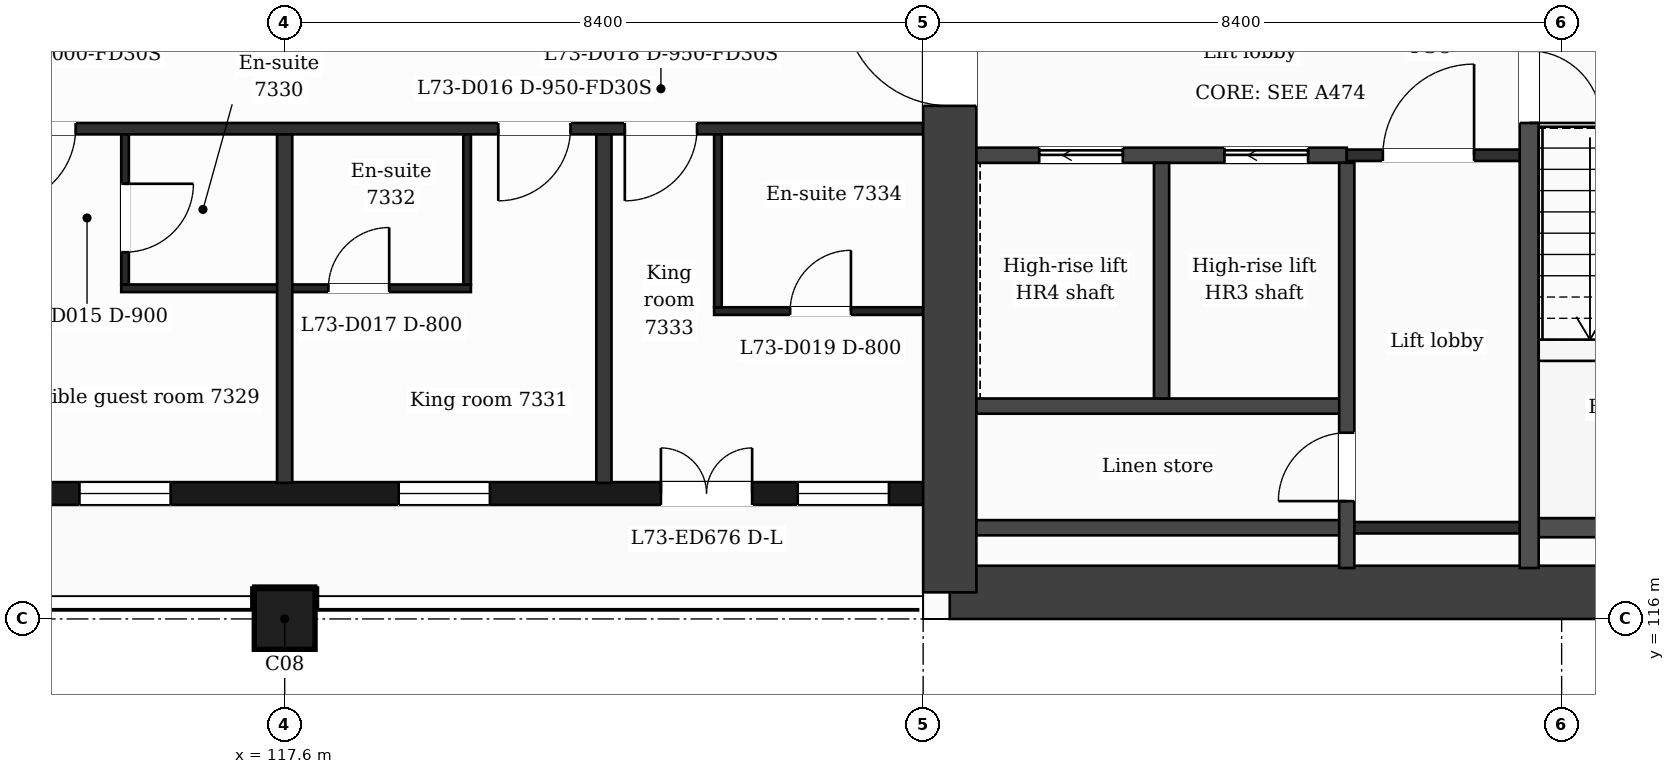
"""IFC4 building model, lengths in metres.
Left out: names, types, materials, properties, quantities, classifications, styles, units other than length and angle.
Written with IfcOpenShell. Run it as: python <this file> out.ifc"""

import sys

from ifc_helpers import new_model, si_unit, direction, frame, frame_2d, origin, origin_2d, place, context, subcontext, project, spatial, rectangle, extrude, element, fill, save


model = new_model("IFC4")
c1 = context("Model", 3, precision=1e-05, world=origin(), true_north=direction((0.0, 1.0)))
c2 = subcontext(c1, "Body", "Model", "MODEL_VIEW")
j1 = project(units=[si_unit("LENGTHUNIT", "METRE"), si_unit("PLANEANGLEUNIT", "RADIAN")], contexts=[c1])
p1 = place(None, origin())
s1 = spatial("IfcSite", under=j1, at=p1, CompositionType="ELEMENT")
p2 = place(p1, origin())
s2 = spatial("IfcBuilding", under=s1, at=p2, CompositionType="ELEMENT")
p3 = place(p2, frame((0.0, 0.0, 299.7)))
s3 = spatial("IfcBuildingStorey", under=s2, at=p3, CompositionType="ELEMENT", Elevation=299.7)
p4 = place(p3, frame((139.977, 116.35, 0.0), z_axis=(0.0, 0.0, 1.0), x_axis=(-1.0, 0.0, 0.0)))
e1 = element("IfcWall", 1, at=p4, inside=s3, PredefinedType="SHEAR", context=c2, shape_type="SweptSolid", body=[
    extrude(rectangle(XDim=13.626, YDim=0.7, at=frame_2d((6.813, 0.0))), origin(), (0.0, 0.0, 1.0), 3.7),
])
p5 = place(p3, frame((126.35, 116.35, 0.0), z_axis=(0.0, 0.0, 1.0), x_axis=(0.0, 1.0, 0.0)))
e2 = element("IfcWall", 2, at=p5, inside=s3, PredefinedType="SHEAR", context=c2, shape_type="SweptSolid", body=[
    extrude(rectangle(XDim=15.7, YDim=0.7, at=frame_2d((7.85, 0.0))), origin(), (0.0, 0.0, 1.0), 3.7),
])
p6 = place(p5, frame((6.4, 0.0, 0.0)))
e3 = element("IfcOpeningElement", 3, at=p6, cuts=e2, PredefinedType="OPENING", context=c2, shape_type="SweptSolid", body=[
    extrude(rectangle(XDim=1.4, YDim=2.1, at=frame_2d((0.7, 1.05))), frame((0.0, 0.36, 0.0), z_axis=(0.0, -1.0, 0.0), x_axis=(1.0, 0.0, 0.0)), (0.0, 0.0, 1.0), 0.72),
])
p7 = place(p3, frame((117.6, 116.0, 0.0), z_axis=(0.0, 0.0, 1.0), x_axis=(1.0, 0.0, 0.0)))
e4 = element("IfcColumn", 4, at=p7, inside=s3, PredefinedType="COLUMN", context=c2, shape_type="SweptSolid", body=[
    extrude(rectangle(XDim=0.8, YDim=0.8, at=origin_2d()), origin(), (0.0, 0.0, 1.0), 3.7),
])
p8 = place(p3, frame((100.8, 117.65, 0.0), z_axis=(0.0, 0.0, 1.0), x_axis=(1.0, 0.0, 0.0)))
e5 = element("IfcWall", 5, at=p8, inside=s3, PredefinedType="SOLIDWALL", context=c2, shape_type="SweptSolid", body=[
    extrude(rectangle(XDim=25.2, YDim=0.3, at=frame_2d((12.6, 0.0))), origin(), (0.0, 0.0, 1.0), 3.25),
])
p9 = place(p8, frame((0.95, 0.0, 0.9)))
e6 = element("IfcOpeningElement", 6, at=p9, cuts=e5, PredefinedType="OPENING", context=c2, shape_type="SweptSolid", body=[
    extrude(rectangle(XDim=2.4, YDim=2.1, at=frame_2d((1.2, 1.05))), frame((0.0, 0.16, 0.0), z_axis=(0.0, -1.0, 0.0), x_axis=(1.0, 0.0, 0.0)), (0.0, 0.0, 1.0), 0.32),
])
p10 = place(p8, frame((5.1, 0.0, 0.9)))
e7 = element("IfcOpeningElement", 7, at=p10, cuts=e5, PredefinedType="OPENING", context=c2, shape_type="SweptSolid", body=[
    extrude(rectangle(XDim=2.4, YDim=2.1, at=frame_2d((1.2, 1.05))), frame((0.0, 0.16, 0.0), z_axis=(0.0, -1.0, 0.0), x_axis=(1.0, 0.0, 0.0)), (0.0, 0.0, 1.0), 0.32),
])
p11 = place(p8, frame((9.3, 0.0, 0.9)))
e8 = element("IfcOpeningElement", 8, at=p11, cuts=e5, PredefinedType="OPENING", context=c2, shape_type="SweptSolid", body=[
    extrude(rectangle(XDim=2.4, YDim=2.1, at=frame_2d((1.2, 1.05))), frame((0.0, 0.16, 0.0), z_axis=(0.0, -1.0, 0.0), x_axis=(1.0, 0.0, 0.0)), (0.0, 0.0, 1.0), 0.32),
])
p12 = place(p8, frame((14.1, 0.0, 0.9)))
e9 = element("IfcOpeningElement", 9, at=p12, cuts=e5, PredefinedType="OPENING", context=c2, shape_type="SweptSolid", body=[
    extrude(rectangle(XDim=1.2, YDim=2.1, at=frame_2d((0.6, 1.05))), frame((0.0, 0.16, 0.0), z_axis=(0.0, -1.0, 0.0), x_axis=(1.0, 0.0, 0.0)), (0.0, 0.0, 1.0), 0.32),
])
p13 = place(p8, frame((18.3, 0.0, 0.9)))
e10 = element("IfcOpeningElement", 10, at=p13, cuts=e5, PredefinedType="OPENING", context=c2, shape_type="SweptSolid", body=[
    extrude(rectangle(XDim=1.2, YDim=2.1, at=frame_2d((0.6, 1.05))), frame((0.0, 0.16, 0.0), z_axis=(0.0, -1.0, 0.0), x_axis=(1.0, 0.0, 0.0)), (0.0, 0.0, 1.0), 0.32),
])
p14 = place(p8, frame((21.75, 0.0, 0.0)))
e11 = element("IfcOpeningElement", 11, at=p14, cuts=e5, PredefinedType="OPENING", context=c2, shape_type="SweptSolid", body=[
    extrude(rectangle(XDim=1.2, YDim=2.4, at=frame_2d((0.6, 1.2))), frame((0.0, 0.16, 0.0), z_axis=(0.0, -1.0, 0.0), x_axis=(1.0, 0.0, 0.0)), (0.0, 0.0, 1.0), 0.32),
])
p15 = place(p8, frame((23.55, 0.0, 0.9)))
e12 = element("IfcOpeningElement", 12, at=p15, cuts=e5, PredefinedType="OPENING", context=c2, shape_type="SweptSolid", body=[
    extrude(rectangle(XDim=1.2, YDim=2.1, at=frame_2d((0.6, 1.05))), frame((0.0, 0.16, 0.0), z_axis=(0.0, -1.0, 0.0), x_axis=(1.0, 0.0, 0.0)), (0.0, 0.0, 1.0), 0.32),
])
p16 = place(p3, frame((126.7, 117.2, 0.0), z_axis=(0.0, 0.0, 1.0), x_axis=(1.0, 0.0, 0.0)))
e13 = element("IfcWall", 13, at=p16, inside=s3, PredefinedType="PARTITIONING", context=c2, shape_type="SweptSolid", body=[
    extrude(rectangle(XDim=4.873, YDim=0.2, at=frame_2d((2.437, 0.0))), origin(), (0.0, 0.0, 1.0), 3.25),
])
p17 = place(p3, frame((131.573, 117.2, 0.0), z_axis=(0.0, 0.0, 1.0), x_axis=(1.0, 0.0, 0.0)))
e14 = element("IfcWall", 14, at=p17, inside=s3, PredefinedType="PARTITIONING", context=c2, shape_type="SweptSolid", body=[
    extrude(rectangle(XDim=2.4, YDim=0.15, at=frame_2d((1.2, 0.0))), origin(), (0.0, 0.0, 1.0), 3.25),
])
p18 = place(p3, frame((133.973, 117.2, 0.0), z_axis=(0.0, 0.0, 1.0), x_axis=(1.0, 0.0, 0.0)))
e15 = element("IfcWall", 15, at=p18, inside=s3, PredefinedType="PARTITIONING", context=c2, shape_type="SweptSolid", body=[
    extrude(rectangle(XDim=3.275, YDim=0.25, at=frame_2d((1.638, 0.0))), origin(), (0.0, 0.0, 1.0), 3.25),
])
p19 = place(p3, frame((126.7, 118.8, 0.0), z_axis=(0.0, 0.0, 1.0), x_axis=(1.0, 0.0, 0.0)))
e16 = element("IfcWall", 16, at=p19, inside=s3, PredefinedType="PARTITIONING", context=c2, shape_type="SweptSolid", body=[
    extrude(rectangle(XDim=4.873, YDim=0.2, at=frame_2d((2.437, 0.0))), origin(), (0.0, 0.0, 1.0), 3.25),
])
p20 = place(p3, frame((123.25, 120.05, 0.0), z_axis=(0.0, 0.0, 1.0), x_axis=(1.0, 0.0, 0.0)))
e17 = element("IfcWall", 17, at=p20, inside=s3, PredefinedType="PARTITIONING", context=c2, shape_type="SweptSolid", body=[
    extrude(rectangle(XDim=2.75, YDim=0.1, at=frame_2d((1.375, 0.0))), origin(), (0.0, 0.0, 1.0), 3.25),
])
p21 = place(p20, frame((1.0, 0.0, 0.0)))
e18 = element("IfcOpeningElement", 18, at=p21, cuts=e17, PredefinedType="OPENING", context=c2, shape_type="SweptSolid", body=[
    extrude(rectangle(XDim=0.8, YDim=2.1, at=frame_2d((0.4, 1.05))), frame((0.0, 0.06, 0.0), z_axis=(0.0, -1.0, 0.0), x_axis=(1.0, 0.0, 0.0)), (0.0, 0.0, 1.0), 0.12),
])
p22 = place(p3, frame((115.45, 120.35, 0.0), z_axis=(0.0, 0.0, 1.0), x_axis=(1.0, 0.0, 0.0)))
e19 = element("IfcWall", 19, at=p22, inside=s3, PredefinedType="PARTITIONING", context=c2, shape_type="SweptSolid", body=[
    extrude(rectangle(XDim=4.6, YDim=0.1, at=frame_2d((2.3, 0.0))), origin(), (0.0, 0.0, 1.0), 3.25),
])
p23 = place(p22, frame((2.725, 0.0, 0.0)))
e20 = element("IfcOpeningElement", 20, at=p23, cuts=e19, PredefinedType="OPENING", context=c2, shape_type="SweptSolid", body=[
    extrude(rectangle(XDim=0.8, YDim=2.1, at=frame_2d((0.4, 1.05))), frame((0.0, 0.06, 0.0), z_axis=(0.0, -1.0, 0.0), x_axis=(1.0, 0.0, 0.0)), (0.0, 0.0, 1.0), 0.12),
])
p24 = place(p3, frame((126.7, 122.1, 0.0), z_axis=(0.0, 0.0, 1.0), x_axis=(1.0, 0.0, 0.0)))
e21 = element("IfcWall", 21, at=p24, inside=s3, PredefinedType="PARTITIONING", context=c2, shape_type="SweptSolid", body=[
    extrude(rectangle(XDim=4.873, YDim=0.2, at=frame_2d((2.437, 0.0))), origin(), (0.0, 0.0, 1.0), 3.25),
])
p25 = place(p24, frame((3.264, 0.0, 0.0)))
e22 = element("IfcOpeningElement", 22, at=p25, cuts=e21, PredefinedType="OPENING", context=c2, shape_type="SweptSolid", body=[
    extrude(rectangle(XDim=1.1, YDim=2.1, at=frame_2d((0.55, 1.05))), frame((0.0, 0.11, 0.0), z_axis=(0.0, -1.0, 0.0), x_axis=(1.0, 0.0, 0.0)), (0.0, 0.0, 1.0), 0.22),
])
p26 = place(p24, frame((0.827, 0.0, 0.0)))
e23 = element("IfcOpeningElement", 23, at=p26, cuts=e21, PredefinedType="OPENING", context=c2, shape_type="SweptSolid", body=[
    extrude(rectangle(XDim=1.1, YDim=2.1, at=frame_2d((0.55, 1.05))), frame((0.0, 0.11, 0.0), z_axis=(0.0, -1.0, 0.0), x_axis=(1.0, 0.0, 0.0)), (0.0, 0.0, 1.0), 0.22),
])
p27 = place(p3, frame((131.573, 122.1, 0.0), z_axis=(0.0, 0.0, 1.0), x_axis=(1.0, 0.0, 0.0)))
e24 = element("IfcWall", 24, at=p27, inside=s3, PredefinedType="PARTITIONING", context=c2, shape_type="SweptSolid", body=[
    extrude(rectangle(XDim=2.4, YDim=0.15, at=frame_2d((1.2, 0.0))), origin(), (0.0, 0.0, 1.0), 3.25),
])
p28 = place(p27, frame((0.475, 0.0, 0.0)))
e25 = element("IfcOpeningElement", 25, at=p28, cuts=e24, PredefinedType="OPENING", context=c2, shape_type="SweptSolid", body=[
    extrude(rectangle(XDim=1.2, YDim=2.1, at=frame_2d((0.6, 1.05))), frame((0.0, 0.085, 0.0), z_axis=(0.0, -1.0, 0.0), x_axis=(1.0, 0.0, 0.0)), (0.0, 0.0, 1.0), 0.17),
])
p29 = place(p3, frame((100.8, 122.45, 0.0), z_axis=(0.0, 0.0, 1.0), x_axis=(1.0, 0.0, 0.0)))
e26 = element("IfcWall", 26, at=p29, inside=s3, PredefinedType="PARTITIONING", context=c2, shape_type="SweptSolid", body=[
    extrude(rectangle(XDim=25.2, YDim=0.15, at=frame_2d((12.6, 0.0))), origin(), (0.0, 0.0, 1.0), 3.25),
])
p30 = place(p29, frame((1.6, 0.0, 0.0)))
e27 = element("IfcOpeningElement", 27, at=p30, cuts=e26, PredefinedType="OPENING", context=c2, shape_type="SweptSolid", body=[
    extrude(rectangle(XDim=1.0, YDim=2.1, at=frame_2d((0.5, 1.05))), frame((0.0, 0.085, 0.0), z_axis=(0.0, -1.0, 0.0), x_axis=(1.0, 0.0, 0.0)), (0.0, 0.0, 1.0), 0.17),
])
p31 = place(p29, frame((11.12, 0.0, 0.0)))
e28 = element("IfcOpeningElement", 28, at=p31, cuts=e26, PredefinedType="OPENING", context=c2, shape_type="SweptSolid", body=[
    extrude(rectangle(XDim=0.95, YDim=2.1, at=frame_2d((0.475, 1.05))), frame((0.0, 0.085, 0.0), z_axis=(0.0, -1.0, 0.0), x_axis=(1.0, 0.0, 0.0)), (0.0, 0.0, 1.0), 0.17),
])
p32 = place(p29, frame((13.05, 0.0, 0.0)))
e29 = element("IfcOpeningElement", 29, at=p32, cuts=e26, PredefinedType="OPENING", context=c2, shape_type="SweptSolid", body=[
    extrude(rectangle(XDim=1.0, YDim=2.1, at=frame_2d((0.5, 1.05))), frame((0.0, 0.085, 0.0), z_axis=(0.0, -1.0, 0.0), x_axis=(1.0, 0.0, 0.0)), (0.0, 0.0, 1.0), 0.17),
])
p33 = place(p29, frame((19.61, 0.0, 0.0)))
e30 = element("IfcOpeningElement", 30, at=p33, cuts=e26, PredefinedType="OPENING", context=c2, shape_type="SweptSolid", body=[
    extrude(rectangle(XDim=0.95, YDim=2.1, at=frame_2d((0.475, 1.05))), frame((0.0, 0.085, 0.0), z_axis=(0.0, -1.0, 0.0), x_axis=(1.0, 0.0, 0.0)), (0.0, 0.0, 1.0), 0.17),
])
p34 = place(p29, frame((21.275, 0.0, 0.0)))
e31 = element("IfcOpeningElement", 31, at=p34, cuts=e26, PredefinedType="OPENING", context=c2, shape_type="SweptSolid", body=[
    extrude(rectangle(XDim=0.95, YDim=2.1, at=frame_2d((0.475, 1.05))), frame((0.0, 0.085, 0.0), z_axis=(0.0, -1.0, 0.0), x_axis=(1.0, 0.0, 0.0)), (0.0, 0.0, 1.0), 0.17),
])
p35 = place(p3, frame((115.5, 120.4, 0.0), z_axis=(0.0, 0.0, 1.0), x_axis=(0.0, 1.0, 0.0)))
e32 = element("IfcWall", 32, at=p35, inside=s3, PredefinedType="PARTITIONING", context=c2, shape_type="SweptSolid", body=[
    extrude(rectangle(XDim=1.975, YDim=0.1, at=frame_2d((0.988, 0.0))), origin(), (0.0, 0.0, 1.0), 3.25),
])
p36 = place(p35, frame((0.425, 0.0, 0.0)))
e33 = element("IfcOpeningElement", 33, at=p36, cuts=e32, PredefinedType="OPENING", context=c2, shape_type="SweptSolid", body=[
    extrude(rectangle(XDim=0.9, YDim=2.1, at=frame_2d((0.45, 1.05))), frame((0.0, 0.06, 0.0), z_axis=(0.0, -1.0, 0.0), x_axis=(1.0, 0.0, 0.0)), (0.0, 0.0, 1.0), 0.12),
])
p37 = place(p3, frame((117.6, 117.79, 0.0), z_axis=(0.0, 0.0, 1.0), x_axis=(0.0, 1.0, 0.0)))
e34 = element("IfcWall", 34, at=p37, inside=s3, PredefinedType="PARTITIONING", context=c2, shape_type="SweptSolid", body=[
    extrude(rectangle(XDim=4.585, YDim=0.2, at=frame_2d((2.292, 0.0))), origin(), (0.0, 0.0, 1.0), 3.25),
])
p38 = place(p3, frame((120.0, 120.4, 0.0), z_axis=(0.0, 0.0, 1.0), x_axis=(0.0, 1.0, 0.0)))
e35 = element("IfcWall", 35, at=p38, inside=s3, PredefinedType="PARTITIONING", context=c2, shape_type="SweptSolid", body=[
    extrude(rectangle(XDim=1.975, YDim=0.1, at=frame_2d((0.988, 0.0))), origin(), (0.0, 0.0, 1.0), 3.25),
])
p39 = place(p3, frame((121.8, 117.79, 0.0), z_axis=(0.0, 0.0, 1.0), x_axis=(0.0, 1.0, 0.0)))
e36 = element("IfcWall", 36, at=p39, inside=s3, PredefinedType="PARTITIONING", context=c2, shape_type="SweptSolid", body=[
    extrude(rectangle(XDim=4.585, YDim=0.2, at=frame_2d((2.292, 0.0))), origin(), (0.0, 0.0, 1.0), 3.25),
])
p40 = place(p3, frame((123.3, 120.1, 0.0), z_axis=(0.0, 0.0, 1.0), x_axis=(0.0, 1.0, 0.0)))
e37 = element("IfcWall", 37, at=p40, inside=s3, PredefinedType="PARTITIONING", context=c2, shape_type="SweptSolid", body=[
    extrude(rectangle(XDim=2.275, YDim=0.1, at=frame_2d((1.137, 0.0))), origin(), (0.0, 0.0, 1.0), 3.25),
])
p41 = place(p3, frame((129.136, 118.9, 0.0), z_axis=(0.0, 0.0, 1.0), x_axis=(0.0, 1.0, 0.0)))
e38 = element("IfcWall", 38, at=p41, inside=s3, PredefinedType="PARTITIONING", context=c2, shape_type="SweptSolid", body=[
    extrude(rectangle(XDim=3.1, YDim=0.2, at=frame_2d((1.55, 0.0))), origin(), (0.0, 0.0, 1.0), 3.25),
])
p42 = place(p3, frame((131.573, 116.67, 0.0), z_axis=(0.0, 0.0, 1.0), x_axis=(0.0, 1.0, 0.0)))
e39 = element("IfcWall", 39, at=p42, inside=s3, PredefinedType="PARTITIONING", context=c2, shape_type="SweptSolid", body=[
    extrude(rectangle(XDim=5.33, YDim=0.2, at=frame_2d((2.665, 0.0))), origin(), (0.0, 0.0, 1.0), 3.25),
])
p43 = place(p42, frame((0.88, 0.0, 0.0)))
e40 = element("IfcOpeningElement", 40, at=p43, cuts=e39, PredefinedType="OPENING", context=c2, shape_type="SweptSolid", body=[
    extrude(rectangle(XDim=0.9, YDim=2.1, at=frame_2d((0.45, 1.05))), frame((0.0, 0.11, 0.0), z_axis=(0.0, -1.0, 0.0), x_axis=(1.0, 0.0, 0.0)), (0.0, 0.0, 1.0), 0.22),
])
p44 = place(p3, frame((133.973, 116.67, 0.0), z_axis=(0.0, 0.0, 1.0), x_axis=(0.0, 1.0, 0.0)))
e41 = element("IfcWall", 41, at=p44, inside=s3, PredefinedType="PARTITIONING", context=c2, shape_type="SweptSolid", body=[
    extrude(rectangle(XDim=7.155, YDim=0.25, at=frame_2d((3.578, 0.0))), origin(), (0.0, 0.0, 1.0), 3.25),
])
p45 = place(p44, frame((5.855, 0.0, 0.0)))
e42 = element("IfcOpeningElement", 42, at=p45, cuts=e41, PredefinedType="OPENING", context=c2, shape_type="SweptSolid", body=[
    extrude(rectangle(XDim=0.95, YDim=2.1, at=frame_2d((0.475, 1.05))), frame((0.0, 0.135, 0.0), z_axis=(0.0, -1.0, 0.0), x_axis=(1.0, 0.0, 0.0)), (0.0, 0.0, 1.0), 0.27),
])
p46 = place(p12, origin())
e43 = element("IfcWindow", 43, at=p46, inside=s3, PartitioningType="SINGLE_PANEL", PredefinedType="WINDOW", context=c2, shape_type="SweptSolid", body=[
    extrude(rectangle(XDim=1.2, YDim=2.1, at=frame_2d((0.6, 1.05))), frame((0.0, 0.03, 0.0), z_axis=(0.0, -1.0, 0.0), x_axis=(1.0, 0.0, 0.0)), (0.0, 0.0, 1.0), 0.06),
])
fill(e9, e43)
p47 = place(p13, origin())
e44 = element("IfcWindow", 44, at=p47, inside=s3, PartitioningType="SINGLE_PANEL", PredefinedType="WINDOW", context=c2, shape_type="SweptSolid", body=[
    extrude(rectangle(XDim=1.2, YDim=2.1, at=frame_2d((0.6, 1.05))), frame((0.0, 0.03, 0.0), z_axis=(0.0, -1.0, 0.0), x_axis=(1.0, 0.0, 0.0)), (0.0, 0.0, 1.0), 0.06),
])
fill(e10, e44)
p48 = place(p14, origin())
e45 = element("IfcDoor", 45, at=p48, inside=s3, OperationType="DOUBLE_DOOR_SINGLE_SWING", PredefinedType="DOOR", context=c2, shape_type="SweptSolid", body=[
    extrude(rectangle(XDim=1.2, YDim=2.4, at=frame_2d((0.6, 1.2))), frame((0.0, 0.025, 0.0), z_axis=(0.0, -1.0, 0.0), x_axis=(1.0, 0.0, 0.0)), (0.0, 0.0, 1.0), 0.05),
])
fill(e11, e45)
p49 = place(p15, origin())
e46 = element("IfcWindow", 46, at=p49, inside=s3, PartitioningType="SINGLE_PANEL", PredefinedType="WINDOW", context=c2, shape_type="SweptSolid", body=[
    extrude(rectangle(XDim=1.2, YDim=2.1, at=frame_2d((0.6, 1.05))), frame((0.0, 0.03, 0.0), z_axis=(0.0, -1.0, 0.0), x_axis=(1.0, 0.0, 0.0)), (0.0, 0.0, 1.0), 0.06),
])
fill(e12, e46)
p50 = place(p28, origin())
e47 = element("IfcDoor", 47, at=p50, inside=s3, OperationType="SINGLE_SWING_RIGHT", PredefinedType="DOOR", context=c2, shape_type="SweptSolid", body=[
    extrude(rectangle(XDim=1.2, YDim=2.1, at=frame_2d((0.6, 1.05))), frame((0.0, 0.025, 0.0), z_axis=(0.0, -1.0, 0.0), x_axis=(1.0, 0.0, 0.0)), (0.0, 0.0, 1.0), 0.05),
])
fill(e25, e47)
p51 = place(p25, origin())
e48 = element("IfcDoor", 48, at=p51, inside=s3, OperationType="SLIDING_TO_LEFT", PredefinedType="DOOR", context=c2, shape_type="SweptSolid", body=[
    extrude(rectangle(XDim=1.1, YDim=2.1, at=frame_2d((0.55, 1.05))), frame((0.0, 0.025, 0.0), z_axis=(0.0, -1.0, 0.0), x_axis=(1.0, 0.0, 0.0)), (0.0, 0.0, 1.0), 0.05),
])
fill(e22, e48)
p52 = place(p26, origin())
e49 = element("IfcDoor", 49, at=p52, inside=s3, OperationType="SLIDING_TO_LEFT", PredefinedType="DOOR", context=c2, shape_type="SweptSolid", body=[
    extrude(rectangle(XDim=1.1, YDim=2.1, at=frame_2d((0.55, 1.05))), frame((0.0, 0.025, 0.0), z_axis=(0.0, -1.0, 0.0), x_axis=(1.0, 0.0, 0.0)), (0.0, 0.0, 1.0), 0.05),
])
fill(e23, e49)
p53 = place(p45, origin())
e50 = element("IfcDoor", 50, at=p53, inside=s3, OperationType="SINGLE_SWING_LEFT", PredefinedType="DOOR", context=c2, shape_type="SweptSolid", body=[
    extrude(rectangle(XDim=0.95, YDim=2.1, at=frame_2d((0.475, 1.05))), frame((0.0, 0.025, 0.0), z_axis=(0.0, -1.0, 0.0), x_axis=(1.0, 0.0, 0.0)), (0.0, 0.0, 1.0), 0.05),
])
fill(e42, e50)
p54 = place(p43, origin())
e51 = element("IfcDoor", 51, at=p54, inside=s3, OperationType="SINGLE_SWING_LEFT", PredefinedType="DOOR", context=c2, shape_type="SweptSolid", body=[
    extrude(rectangle(XDim=0.9, YDim=2.1, at=frame_2d((0.45, 1.05))), frame((0.0, 0.025, 0.0), z_axis=(0.0, -1.0, 0.0), x_axis=(1.0, 0.0, 0.0)), (0.0, 0.0, 1.0), 0.05),
])
fill(e40, e51)
p55 = place(p32, origin())
e52 = element("IfcDoor", 52, at=p55, inside=s3, OperationType="SINGLE_SWING_LEFT", PredefinedType="DOOR", context=c2, shape_type="SweptSolid", body=[
    extrude(rectangle(XDim=1.0, YDim=2.1, at=frame_2d((0.5, 1.05))), frame((0.0, 0.025, 0.0), z_axis=(0.0, -1.0, 0.0), x_axis=(1.0, 0.0, 0.0)), (0.0, 0.0, 1.0), 0.05),
])
fill(e29, e52)
p56 = place(p36, origin())
e53 = element("IfcDoor", 53, at=p56, inside=s3, OperationType="SINGLE_SWING_RIGHT", PredefinedType="DOOR", context=c2, shape_type="SweptSolid", body=[
    extrude(rectangle(XDim=0.9, YDim=2.1, at=frame_2d((0.45, 1.05))), frame((0.0, 0.025, 0.0), z_axis=(0.0, -1.0, 0.0), x_axis=(1.0, 0.0, 0.0)), (0.0, 0.0, 1.0), 0.05),
])
fill(e33, e53)
p57 = place(p33, origin())
e54 = element("IfcDoor", 54, at=p57, inside=s3, OperationType="SINGLE_SWING_LEFT", PredefinedType="DOOR", context=c2, shape_type="SweptSolid", body=[
    extrude(rectangle(XDim=0.95, YDim=2.1, at=frame_2d((0.475, 1.05))), frame((0.0, 0.025, 0.0), z_axis=(0.0, -1.0, 0.0), x_axis=(1.0, 0.0, 0.0)), (0.0, 0.0, 1.0), 0.05),
])
fill(e30, e54)
p58 = place(p23, origin())
e55 = element("IfcDoor", 55, at=p58, inside=s3, OperationType="SINGLE_SWING_RIGHT", PredefinedType="DOOR", context=c2, shape_type="SweptSolid", body=[
    extrude(rectangle(XDim=0.8, YDim=2.1, at=frame_2d((0.4, 1.05))), frame((0.0, 0.025, 0.0), z_axis=(0.0, -1.0, 0.0), x_axis=(1.0, 0.0, 0.0)), (0.0, 0.0, 1.0), 0.05),
])
fill(e20, e55)
p59 = place(p34, origin())
e56 = element("IfcDoor", 56, at=p59, inside=s3, OperationType="SINGLE_SWING_LEFT", PredefinedType="DOOR", context=c2, shape_type="SweptSolid", body=[
    extrude(rectangle(XDim=0.95, YDim=2.1, at=frame_2d((0.475, 1.05))), frame((0.0, 0.025, 0.0), z_axis=(0.0, -1.0, 0.0), x_axis=(1.0, 0.0, 0.0)), (0.0, 0.0, 1.0), 0.05),
])
fill(e31, e56)
p60 = place(p21, origin())
e57 = element("IfcDoor", 57, at=p60, inside=s3, OperationType="SINGLE_SWING_RIGHT", PredefinedType="DOOR", context=c2, shape_type="SweptSolid", body=[
    extrude(rectangle(XDim=0.8, YDim=2.1, at=frame_2d((0.4, 1.05))), frame((0.0, 0.025, 0.0), z_axis=(0.0, -1.0, 0.0), x_axis=(1.0, 0.0, 0.0)), (0.0, 0.0, 1.0), 0.05),
])
fill(e18, e57)
p61 = place(p6, origin())
e58 = element("IfcDoor", 58, at=p61, inside=s3, OperationType="SINGLE_SWING_RIGHT", PredefinedType="DOOR", context=c2, shape_type="SweptSolid", body=[
    extrude(rectangle(XDim=1.4, YDim=2.1, at=frame_2d((0.7, 1.05))), frame((0.0, 0.025, 0.0), z_axis=(0.0, -1.0, 0.0), x_axis=(1.0, 0.0, 0.0)), (0.0, 0.0, 1.0), 0.05),
])
fill(e3, e58)
save(model, sys.argv[1])
